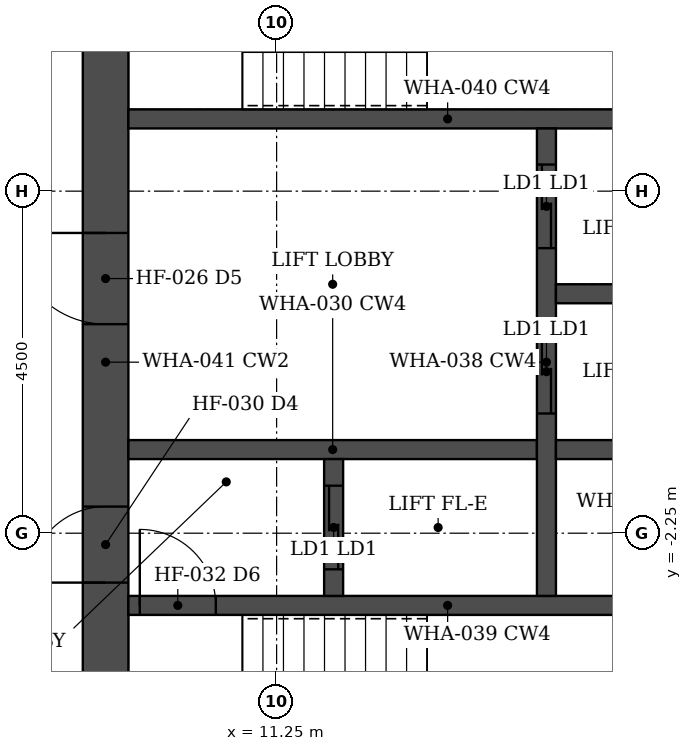
"""IFC4 building model, lengths in metres.
Left out: names, types, materials, properties, quantities, classifications, styles, units other than length and angle.
Written with IfcOpenShell. Run it as: python <this file> out.ifc"""

import sys

from ifc_helpers import new_model, si_unit, direction, frame, frame_2d, origin, place, context, subcontext, project, spatial, rectangle, extrude, element, fill, save


model = new_model("IFC4")
c1 = context("Model", 3, precision=1e-05, world=origin(), true_north=direction((0.0, 1.0)))
c2 = subcontext(c1, "Body", "Model", "MODEL_VIEW")
j1 = project(units=[si_unit("LENGTHUNIT", "METRE"), si_unit("PLANEANGLEUNIT", "RADIAN")], contexts=[c1])
p1 = place(None, origin())
s1 = spatial("IfcSite", under=j1, at=p1, CompositionType="ELEMENT")
p2 = place(p1, origin())
s2 = spatial("IfcBuilding", under=s1, at=p2, CompositionType="ELEMENT")
p3 = place(p2, frame((0.0, 0.0, 172.4)))
s3 = spatial("IfcBuildingStorey", under=s2, at=p3, CompositionType="ELEMENT", Elevation=172.4)
p4 = place(p3, frame((9.0, -6.45, 0.0), z_axis=(0.0, 0.0, 1.0), x_axis=(0.0, 1.0, 0.0)))
e1 = element("IfcWall", 1, at=p4, inside=s3, PredefinedType="SHEAR", context=c2, shape_type="SweptSolid", body=[
    extrude(rectangle(XDim=12.9, YDim=0.6, at=frame_2d((6.45, 0.0))), origin(), (0.0, 0.0, 1.0), 3.6),
])
p5 = place(p4, frame((3.55, 0.0, 0.0)))
e2 = element("IfcOpeningElement", 2, at=p5, cuts=e1, PredefinedType="OPENING", context=c2, shape_type="SweptSolid", body=[
    extrude(rectangle(XDim=1.0, YDim=2.1, at=frame_2d((0.5, 1.05))), frame((0.0, 0.31, 0.0), z_axis=(0.0, -1.0, 0.0), x_axis=(1.0, 0.0, 0.0)), (0.0, 0.0, 1.0), 0.62),
])
p6 = place(p4, frame((6.95, 0.0, 0.0)))
e3 = element("IfcOpeningElement", 3, at=p6, cuts=e1, PredefinedType="OPENING", context=c2, shape_type="SweptSolid", body=[
    extrude(rectangle(XDim=1.2, YDim=2.1, at=frame_2d((0.6, 1.05))), frame((0.0, 0.31, 0.0), z_axis=(0.0, -1.0, 0.0), x_axis=(1.0, 0.0, 0.0)), (0.0, 0.0, 1.0), 0.62),
])
p7 = place(p4, frame((10.85, 0.0, 0.0)))
e4 = element("IfcOpeningElement", 4, at=p7, cuts=e1, PredefinedType="OPENING", context=c2, shape_type="SweptSolid", body=[
    extrude(rectangle(XDim=1.0, YDim=2.1, at=frame_2d((0.5, 1.05))), frame((0.0, 0.31, 0.0), z_axis=(0.0, -1.0, 0.0), x_axis=(1.0, 0.0, 0.0)), (0.0, 0.0, 1.0), 0.62),
])
p8 = place(p3, frame((9.3, -3.2, 0.0), z_axis=(0.0, 0.0, 1.0), x_axis=(1.0, 0.0, 0.0)))
e5 = element("IfcWall", 5, at=p8, inside=s3, PredefinedType="SHEAR", context=c2, shape_type="SweptSolid", body=[
    extrude(rectangle(XDim=8.4, YDim=0.25, at=frame_2d((4.2, 0.0))), origin(), (0.0, 0.0, 1.0), 3.6),
])
p9 = place(p8, frame((0.15, 0.0, 0.0)))
e6 = element("IfcOpeningElement", 6, at=p9, cuts=e5, PredefinedType="OPENING", context=c2, shape_type="SweptSolid", body=[
    extrude(rectangle(XDim=1.0, YDim=2.1, at=frame_2d((0.5, 1.05))), frame((0.0, 0.135, 0.0), z_axis=(0.0, -1.0, 0.0), x_axis=(1.0, 0.0, 0.0)), (0.0, 0.0, 1.0), 0.27),
])
p10 = place(p3, frame((9.3, 3.2, 0.0), z_axis=(0.0, 0.0, 1.0), x_axis=(1.0, 0.0, 0.0)))
e7 = element("IfcWall", 7, at=p10, inside=s3, PredefinedType="SHEAR", context=c2, shape_type="SweptSolid", body=[
    extrude(rectangle(XDim=8.4, YDim=0.25, at=frame_2d((4.2, 0.0))), origin(), (0.0, 0.0, 1.0), 3.6),
])
p11 = place(p3, frame((9.3, -1.15, 0.0), z_axis=(0.0, 0.0, 1.0), x_axis=(1.0, 0.0, 0.0)))
e8 = element("IfcWall", 8, at=p11, inside=s3, PredefinedType="SHEAR", context=c2, shape_type="SweptSolid", body=[
    extrude(rectangle(XDim=5.375, YDim=0.25, at=frame_2d((2.688, 0.0))), origin(), (0.0, 0.0, 1.0), 3.6),
])
p12 = place(p3, frame((12.0, -3.075, 0.0), z_axis=(0.0, 0.0, 1.0), x_axis=(0.0, 1.0, 0.0)))
e9 = element("IfcWall", 9, at=p12, inside=s3, PredefinedType="SHEAR", context=c2, shape_type="SweptSolid", body=[
    extrude(rectangle(XDim=1.8, YDim=0.25, at=frame_2d((0.9, 0.0))), origin(), (0.0, 0.0, 1.0), 3.6),
])
p13 = place(p12, frame((0.35, 0.0, 0.0)))
e10 = element("IfcOpeningElement", 10, at=p13, cuts=e9, PredefinedType="OPENING", context=c2, shape_type="SweptSolid", body=[
    extrude(rectangle(XDim=1.1, YDim=2.1, at=frame_2d((0.55, 1.05))), frame((0.0, 0.135, 0.0), z_axis=(0.0, -1.0, 0.0), x_axis=(1.0, 0.0, 0.0)), (0.0, 0.0, 1.0), 0.27),
])
p14 = place(p3, frame((14.8, -3.075, 0.0), z_axis=(0.0, 0.0, 1.0), x_axis=(0.0, 1.0, 0.0)))
e11 = element("IfcWall", 11, at=p14, inside=s3, PredefinedType="SHEAR", context=c2, shape_type="SweptSolid", body=[
    extrude(rectangle(XDim=6.15, YDim=0.25, at=frame_2d((3.075, 0.0))), origin(), (0.0, 0.0, 1.0), 3.6),
])
p15 = place(p14, frame((2.4, 0.0, 0.0)))
e12 = element("IfcOpeningElement", 12, at=p15, cuts=e11, PredefinedType="OPENING", context=c2, shape_type="SweptSolid", body=[
    extrude(rectangle(XDim=1.1, YDim=2.1, at=frame_2d((0.55, 1.05))), frame((0.0, 0.135, 0.0), z_axis=(0.0, -1.0, 0.0), x_axis=(1.0, 0.0, 0.0)), (0.0, 0.0, 1.0), 0.27),
])
p16 = place(p14, frame((4.575, 0.0, 0.0)))
e13 = element("IfcOpeningElement", 13, at=p16, cuts=e11, PredefinedType="OPENING", context=c2, shape_type="SweptSolid", body=[
    extrude(rectangle(XDim=1.1, YDim=2.1, at=frame_2d((0.55, 1.05))), frame((0.0, 0.135, 0.0), z_axis=(0.0, -1.0, 0.0), x_axis=(1.0, 0.0, 0.0)), (0.0, 0.0, 1.0), 0.27),
])
for number, where, z_axis, x_axis in (
    (14, (14.925, -1.15, 0.0), (0.0, 0.0, 1.0), (1.0, 0.0, 0.0)),
    (15, (14.925, 0.9, 0.0), (0.0, 0.0, 1.0), (1.0, 0.0, 0.0)),
):
    element("IfcWall", number, at=place(p3, frame(where, z_axis=z_axis, x_axis=x_axis)), inside=s3, PredefinedType="SHEAR", context=c2, shape_type="SweptSolid", body=[
        extrude(rectangle(XDim=2.775, YDim=0.25, at=frame_2d((1.387, 0.0))), origin(), (0.0, 0.0, 1.0), 3.6),
    ])
p17 = place(p5, origin())
e16 = element("IfcDoor", 16, at=p17, inside=s3, OperationType="SINGLE_SWING_LEFT", PredefinedType="DOOR", context=c2, shape_type="SweptSolid", body=[
    extrude(rectangle(XDim=1.0, YDim=2.1, at=frame_2d((0.5, 1.05))), frame((0.0, 0.025, 0.0), z_axis=(0.0, -1.0, 0.0), x_axis=(1.0, 0.0, 0.0)), (0.0, 0.0, 1.0), 0.05),
])
fill(e2, e16)
p18 = place(p9, origin())
e17 = element("IfcDoor", 17, at=p18, inside=s3, OperationType="SINGLE_SWING_LEFT", PredefinedType="DOOR", context=c2, shape_type="SweptSolid", body=[
    extrude(rectangle(XDim=1.0, YDim=2.1, at=frame_2d((0.5, 1.05))), frame((0.0, 0.025, 0.0), z_axis=(0.0, -1.0, 0.0), x_axis=(1.0, 0.0, 0.0)), (0.0, 0.0, 1.0), 0.05),
])
fill(e6, e17)
p19 = place(p6, origin())
e18 = element("IfcDoor", 18, at=p19, inside=s3, OperationType="SINGLE_SWING_RIGHT", PredefinedType="DOOR", context=c2, shape_type="SweptSolid", body=[
    extrude(rectangle(XDim=1.2, YDim=2.1, at=frame_2d((0.6, 1.05))), frame((0.0, 0.025, 0.0), z_axis=(0.0, -1.0, 0.0), x_axis=(1.0, 0.0, 0.0)), (0.0, 0.0, 1.0), 0.05),
])
fill(e3, e18)
p20 = place(p13, origin())
e19 = element("IfcDoor", 19, at=p20, inside=s3, OperationType="DOUBLE_DOOR_SLIDING", PredefinedType="DOOR", context=c2, shape_type="SweptSolid", body=[
    extrude(rectangle(XDim=1.1, YDim=2.1, at=frame_2d((0.55, 1.05))), frame((0.0, 0.025, 0.0), z_axis=(0.0, -1.0, 0.0), x_axis=(1.0, 0.0, 0.0)), (0.0, 0.0, 1.0), 0.05),
])
fill(e10, e19)
p21 = place(p15, origin())
e20 = element("IfcDoor", 20, at=p21, inside=s3, OperationType="DOUBLE_DOOR_SLIDING", PredefinedType="DOOR", context=c2, shape_type="SweptSolid", body=[
    extrude(rectangle(XDim=1.1, YDim=2.1, at=frame_2d((0.55, 1.05))), frame((0.0, 0.025, 0.0), z_axis=(0.0, -1.0, 0.0), x_axis=(1.0, 0.0, 0.0)), (0.0, 0.0, 1.0), 0.05),
])
fill(e12, e20)
p22 = place(p16, origin())
e21 = element("IfcDoor", 21, at=p22, inside=s3, OperationType="DOUBLE_DOOR_SLIDING", PredefinedType="DOOR", context=c2, shape_type="SweptSolid", body=[
    extrude(rectangle(XDim=1.1, YDim=2.1, at=frame_2d((0.55, 1.05))), frame((0.0, 0.025, 0.0), z_axis=(0.0, -1.0, 0.0), x_axis=(1.0, 0.0, 0.0)), (0.0, 0.0, 1.0), 0.05),
])
fill(e13, e21)
save(model, sys.argv[1])
